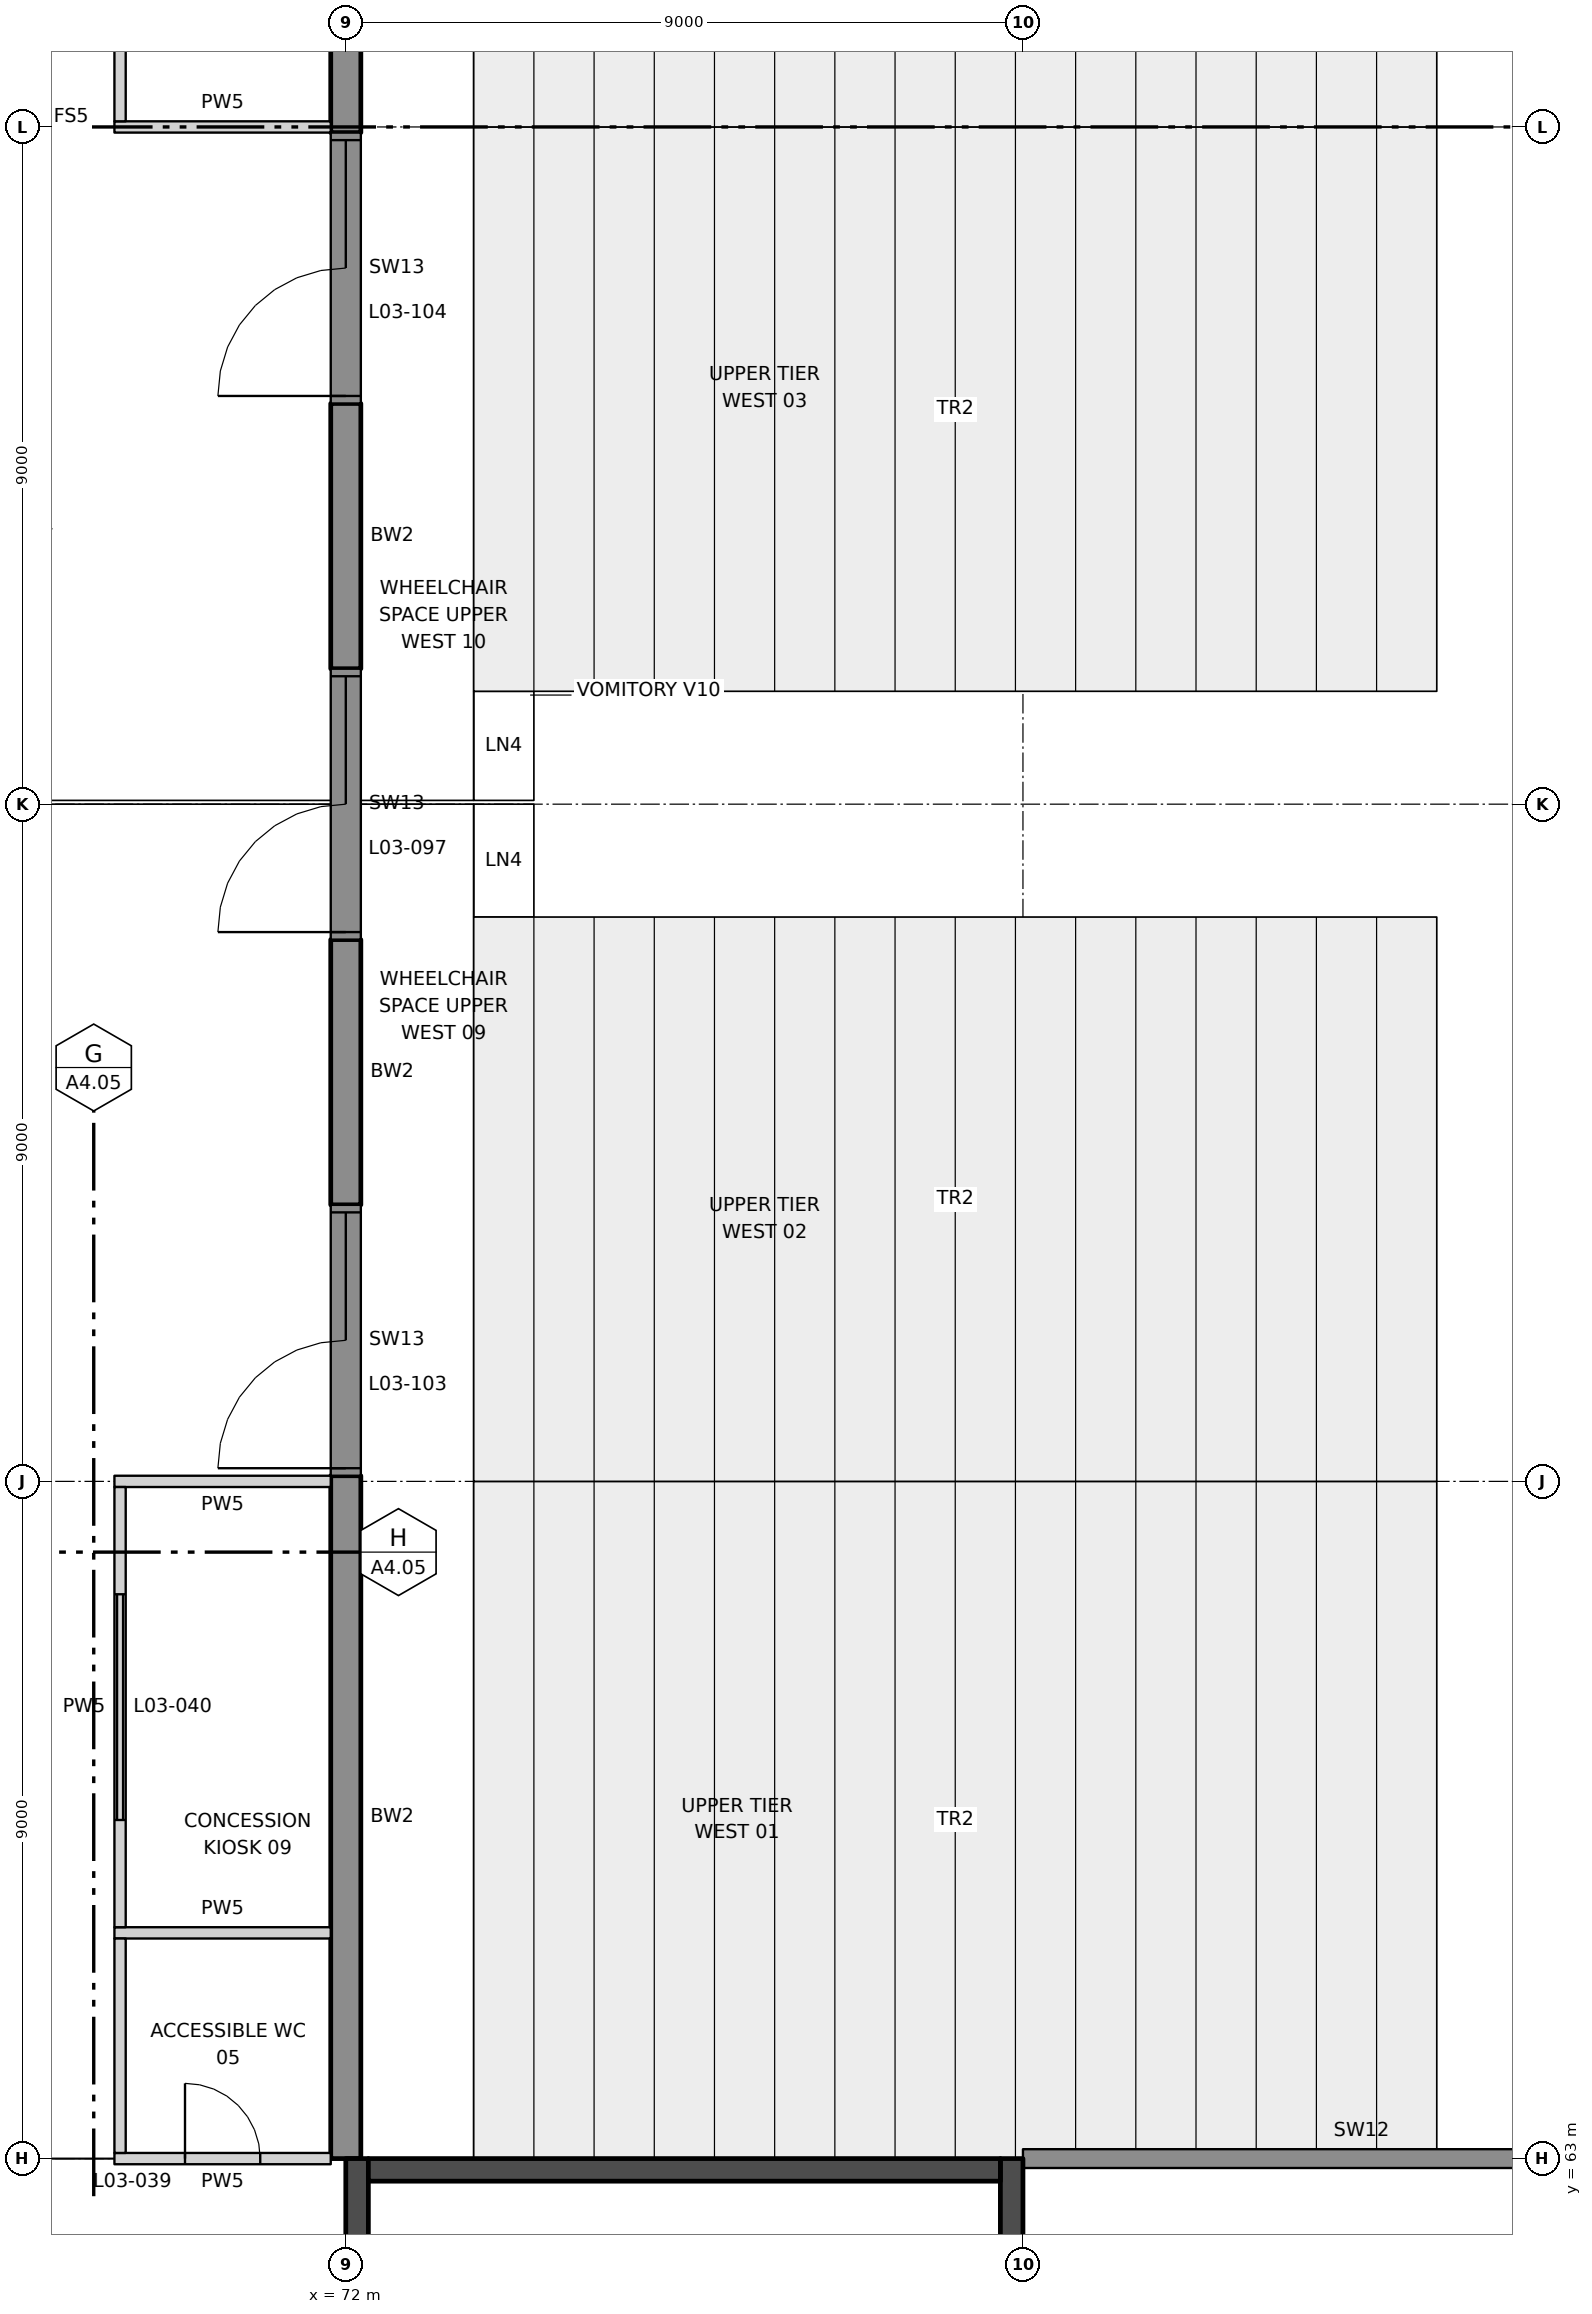
"""IFC4 building model, lengths in metres.
Left out: names, types, materials, properties, quantities, classifications, styles, units other than length and angle.
Written with IfcOpenShell. Run it as: python <this file> out.ifc"""

import sys

from ifc_helpers import new_model, si_unit, direction, frame, frame_2d, origin, place, context, subcontext, project, spatial, rectangle, extrude, element, fill, save


model = new_model("IFC4")
c1 = context("Model", 3, precision=1e-05, world=origin(), true_north=direction((0.0, 1.0)))
c2 = subcontext(c1, "Body", "Model", "MODEL_VIEW")
j1 = project(units=[si_unit("LENGTHUNIT", "METRE"), si_unit("PLANEANGLEUNIT", "RADIAN")], contexts=[c1])
p1 = place(None, origin())
s1 = spatial("IfcSite", under=j1, at=p1, CompositionType="ELEMENT")
p2 = place(p1, origin())
s2 = spatial("IfcBuilding", under=s1, at=p2, CompositionType="ELEMENT")
p3 = place(p2, frame((0.0, 0.0, 22.0)))
s3 = spatial("IfcBuildingStorey", under=s2, at=p3, CompositionType="ELEMENT", Elevation=22.0)
p4 = place(p3, frame((72.0, 99.0, 0.0), z_axis=(0.0, 0.0, 1.0), x_axis=(0.0, -1.0, 0.0)))
e1 = element("IfcWall", 1, at=p4, inside=s3, PredefinedType="SOLIDWALL", context=c2, shape_type="SweptSolid", body=[
    extrude(rectangle(XDim=9.075, YDim=0.4, at=frame_2d((4.538, 0.0))), origin(), (0.0, 0.0, 1.0), 6.0),
])
for number, where, z_axis, x_axis in (
    (2, (72.0, 86.325, 0.0), (0.0, 0.0, 1.0), (0.0, -1.0, 0.0)),
    (3, (72.0, 79.2, 0.0), (0.0, 0.0, 1.0), (0.0, -1.0, 0.0)),
):
    element("IfcWall", number, at=place(p3, frame(where, z_axis=z_axis, x_axis=x_axis)), inside=s3, PredefinedType="SOLIDWALL", context=c2, shape_type="SweptSolid", body=[
        extrude(rectangle(XDim=3.525, YDim=0.4, at=frame_2d((1.762, 0.0))), origin(), (0.0, 0.0, 1.0), 6.0),
    ])
p5 = place(p3, frame((72.0, 72.075, 0.0), z_axis=(0.0, 0.0, 1.0), x_axis=(0.0, -1.0, 0.0)))
e4 = element("IfcWall", 4, at=p5, inside=s3, PredefinedType="SOLIDWALL", context=c2, shape_type="SweptSolid", body=[
    extrude(rectangle(XDim=9.075, YDim=0.4, at=frame_2d((4.538, 0.0))), origin(), (0.0, 0.0, 1.0), 6.0),
])
p6 = place(p3, frame((68.925, 63.0, 0.0), z_axis=(0.0, 0.0, 1.0), x_axis=(1.0, 0.0, 0.0)))
e5 = element("IfcWall", 5, at=p6, inside=s3, PredefinedType="PARTITIONING", context=c2, shape_type="SweptSolid", body=[
    extrude(rectangle(XDim=2.875, YDim=0.15, at=frame_2d((1.438, 0.0))), origin(), (0.0, 0.0, 1.0), 4.7),
])
p7 = place(p6, frame((0.938, 0.0, 0.0)))
e6 = element("IfcOpeningElement", 6, at=p7, cuts=e5, PredefinedType="OPENING", context=c2, shape_type="SweptSolid", body=[
    extrude(rectangle(XDim=1.0, YDim=2.1, at=frame_2d((0.5, 1.05))), frame((0.0, 0.085, 0.0), z_axis=(0.0, -1.0, 0.0), x_axis=(1.0, 0.0, 0.0)), (0.0, 0.0, 1.0), 0.17),
])
p8 = place(p3, frame((68.925, 66.0, 0.0), z_axis=(0.0, 0.0, 1.0), x_axis=(1.0, 0.0, 0.0)))
e7 = element("IfcWall", 7, at=p8, inside=s3, PredefinedType="PARTITIONING", context=c2, shape_type="SweptSolid", body=[
    extrude(rectangle(XDim=2.875, YDim=0.15, at=frame_2d((1.438, 0.0))), origin(), (0.0, 0.0, 1.0), 6.0),
])
for number, where, z_axis, x_axis in (
    (8, (68.925, 72.0, 0.0), (0.0, 0.0, 1.0), (1.0, 0.0, 0.0)),
    (9, (68.925, 90.0, 0.0), (0.0, 0.0, 1.0), (1.0, 0.0, 0.0)),
):
    element("IfcWall", number, at=place(p3, frame(where, z_axis=z_axis, x_axis=x_axis)), inside=s3, PredefinedType="PARTITIONING", context=c2, shape_type="SweptSolid", body=[
        extrude(rectangle(XDim=2.875, YDim=0.15, at=frame_2d((1.438, 0.0))), origin(), (0.0, 0.0, 1.0), 4.7),
    ])
p9 = place(p3, frame((69.0, 63.075, 0.0), z_axis=(0.0, 0.0, 1.0), x_axis=(0.0, 1.0, 0.0)))
e10 = element("IfcWall", 10, at=p9, inside=s3, PredefinedType="PARTITIONING", context=c2, shape_type="SweptSolid", body=[
    extrude(rectangle(XDim=2.85, YDim=0.15, at=frame_2d((1.425, 0.0))), origin(), (0.0, 0.0, 1.0), 6.0),
])
p10 = place(p3, frame((69.0, 66.075, 0.0), z_axis=(0.0, 0.0, 1.0), x_axis=(0.0, 1.0, 0.0)))
e11 = element("IfcWall", 11, at=p10, inside=s3, PredefinedType="PARTITIONING", context=c2, shape_type="SweptSolid", body=[
    extrude(rectangle(XDim=5.85, YDim=0.15, at=frame_2d((2.925, 0.0))), origin(), (0.0, 0.0, 1.0), 6.0),
])
p11 = place(p10, frame((1.425, 0.0, 0.0)))
e12 = element("IfcOpeningElement", 12, at=p11, cuts=e11, PredefinedType="OPENING", context=c2, shape_type="SweptSolid", body=[
    extrude(rectangle(XDim=3.0, YDim=2.4, at=frame_2d((1.5, 1.2))), frame((0.0, 0.085, 0.0), z_axis=(0.0, -1.0, 0.0), x_axis=(1.0, 0.0, 0.0)), (0.0, 0.0, 1.0), 0.17),
])
p12 = place(p3, frame((69.0, 90.075, 0.0), z_axis=(0.0, 0.0, 1.0), x_axis=(0.0, 1.0, 0.0)))
e13 = element("IfcWall", 13, at=p12, inside=s3, PredefinedType="PARTITIONING", context=c2, shape_type="SweptSolid", body=[
    extrude(rectangle(XDim=5.85, YDim=0.15, at=frame_2d((2.925, 0.0))), origin(), (0.0, 0.0, 1.0), 6.0),
])
p13 = place(p12, frame((1.425, 0.0, 0.0)))
e14 = element("IfcOpeningElement", 14, at=p13, cuts=e13, PredefinedType="OPENING", context=c2, shape_type="SweptSolid", body=[
    extrude(rectangle(XDim=3.0, YDim=2.4, at=frame_2d((1.5, 1.2))), frame((0.0, 0.085, 0.0), z_axis=(0.0, -1.0, 0.0), x_axis=(1.0, 0.0, 0.0)), (0.0, 0.0, 1.0), 0.17),
])
p14 = place(p3, frame((80.85, 63.0, 0.0), z_axis=(0.0, 0.0, 1.0), x_axis=(0.0, -1.0, 0.0)))
e15 = element("IfcWall", 15, at=p14, inside=s3, PredefinedType="SHEAR", context=c2, shape_type="SweptSolid", body=[
    extrude(rectangle(XDim=18.0, YDim=0.3, at=frame_2d((9.0, 0.0))), origin(), (0.0, 0.0, 1.0), 6.0),
])
p15 = place(p14, frame((8.6, 0.0, 0.0)))
e16 = element("IfcOpeningElement", 16, at=p15, cuts=e15, PredefinedType="OPENING", context=c2, shape_type="SweptSolid", body=[
    extrude(rectangle(XDim=1.2, YDim=2.1, at=frame_2d((0.6, 1.05))), frame((0.0, 0.16, 0.0), z_axis=(0.0, -1.0, 0.0), x_axis=(1.0, 0.0, 0.0)), (0.0, 0.0, 1.0), 0.32),
])
p16 = place(p3, frame((72.15, 63.0, 0.0), z_axis=(0.0, 0.0, 1.0), x_axis=(0.0, -1.0, 0.0)))
e17 = element("IfcWall", 17, at=p16, inside=s3, PredefinedType="SHEAR", context=c2, shape_type="SweptSolid", body=[
    extrude(rectangle(XDim=18.0, YDim=0.3, at=frame_2d((9.0, 0.0))), origin(), (0.0, 0.0, 1.0), 6.0),
])
p17 = place(p3, frame((80.7, 62.85, 0.0), z_axis=(0.0, 0.0, 1.0), x_axis=(-1.0, 0.0, 0.0)))
e18 = element("IfcWall", 18, at=p17, inside=s3, PredefinedType="SHEAR", context=c2, shape_type="SweptSolid", body=[
    extrude(rectangle(XDim=8.4, YDim=0.3, at=frame_2d((4.2, 0.0))), origin(), (0.0, 0.0, 1.0), 6.0),
])
p18 = place(p3, frame((81.0, 63.0, 0.0), z_axis=(0.0, 0.0, 1.0), x_axis=(1.0, 0.0, 0.0)))
e19 = element("IfcWall", 19, at=p18, inside=s3, PredefinedType="SOLIDWALL", context=c2, shape_type="SweptSolid", body=[
    extrude(rectangle(XDim=9.0, YDim=0.25, at=frame_2d((4.5, 0.0))), origin(), (0.0, 0.0, 1.0), 4.7),
])
p19 = place(p3, frame((72.0, 79.2, 0.0), z_axis=(0.0, 0.0, 1.0), x_axis=(0.0, 1.0, 0.0)))
e20 = element("IfcWall", 20, at=p19, inside=s3, PredefinedType="SOLIDWALL", context=c2, shape_type="SweptSolid", body=[
    extrude(rectangle(XDim=3.6, YDim=0.4, at=frame_2d((1.8, 0.0))), origin(), (0.0, 0.0, 1.0), 3.0),
])
p20 = place(p19, frame((0.1, 0.0, 0.0)))
e21 = element("IfcOpeningElement", 21, at=p20, cuts=e20, PredefinedType="OPENING", context=c2, shape_type="SweptSolid", body=[
    extrude(rectangle(XDim=3.4, YDim=2.4, at=frame_2d((1.7, 1.2))), frame((0.0, 0.21, 0.0), z_axis=(0.0, -1.0, 0.0), x_axis=(1.0, 0.0, 0.0)), (0.0, 0.0, 1.0), 0.42),
])
p21 = place(p3, frame((72.0, 72.075, 0.0), z_axis=(0.0, 0.0, 1.0), x_axis=(0.0, 1.0, 0.0)))
e22 = element("IfcWall", 22, at=p21, inside=s3, PredefinedType="SOLIDWALL", context=c2, shape_type="SweptSolid", body=[
    extrude(rectangle(XDim=3.6, YDim=0.4, at=frame_2d((1.8, 0.0))), origin(), (0.0, 0.0, 1.0), 3.0),
])
p22 = place(p21, frame((0.1, 0.0, 0.0)))
e23 = element("IfcOpeningElement", 23, at=p22, cuts=e22, PredefinedType="OPENING", context=c2, shape_type="SweptSolid", body=[
    extrude(rectangle(XDim=3.4, YDim=2.4, at=frame_2d((1.7, 1.2))), frame((0.0, 0.21, 0.0), z_axis=(0.0, -1.0, 0.0), x_axis=(1.0, 0.0, 0.0)), (0.0, 0.0, 1.0), 0.42),
])
p23 = place(p3, frame((72.0, 86.325, 0.0), z_axis=(0.0, 0.0, 1.0), x_axis=(0.0, 1.0, 0.0)))
e24 = element("IfcWall", 24, at=p23, inside=s3, PredefinedType="SOLIDWALL", context=c2, shape_type="SweptSolid", body=[
    extrude(rectangle(XDim=3.6, YDim=0.4, at=frame_2d((1.8, 0.0))), origin(), (0.0, 0.0, 1.0), 3.0),
])
p24 = place(p23, frame((0.1, 0.0, 0.0)))
e25 = element("IfcOpeningElement", 25, at=p24, cuts=e24, PredefinedType="OPENING", context=c2, shape_type="SweptSolid", body=[
    extrude(rectangle(XDim=3.4, YDim=2.4, at=frame_2d((1.7, 1.2))), frame((0.0, 0.21, 0.0), z_axis=(0.0, -1.0, 0.0), x_axis=(1.0, 0.0, 0.0)), (0.0, 0.0, 1.0), 0.42),
])
p25 = place(p7, origin())
e26 = element("IfcDoor", 26, at=p25, inside=s3, OperationType="SINGLE_SWING_LEFT", PredefinedType="DOOR", context=c2, shape_type="SweptSolid", body=[
    extrude(rectangle(XDim=1.0, YDim=2.1, at=frame_2d((0.5, 1.05))), frame((0.0, 0.025, 0.0), z_axis=(0.0, -1.0, 0.0), x_axis=(1.0, 0.0, 0.0)), (0.0, 0.0, 1.0), 0.05),
])
fill(e6, e26)
p26 = place(p11, origin())
e27 = element("IfcDoor", 27, at=p26, inside=s3, OperationType="ROLLINGUP", PredefinedType="DOOR", context=c2, shape_type="SweptSolid", body=[
    extrude(rectangle(XDim=3.0, YDim=2.4, at=frame_2d((1.5, 1.2))), frame((0.0, 0.025, 0.0), z_axis=(0.0, -1.0, 0.0), x_axis=(1.0, 0.0, 0.0)), (0.0, 0.0, 1.0), 0.05),
])
fill(e12, e27)
p27 = place(p20, origin())
e28 = element("IfcDoor", 28, at=p27, inside=s3, OperationType="DOUBLE_DOOR_SINGLE_SWING", PredefinedType="DOOR", context=c2, shape_type="SweptSolid", body=[
    extrude(rectangle(XDim=3.4, YDim=2.4, at=frame_2d((1.7, 1.2))), frame((0.0, 0.025, 0.0), z_axis=(0.0, -1.0, 0.0), x_axis=(1.0, 0.0, 0.0)), (0.0, 0.0, 1.0), 0.05),
])
fill(e21, e28)
p28 = place(p22, origin())
e29 = element("IfcDoor", 29, at=p28, inside=s3, OperationType="DOUBLE_DOOR_SINGLE_SWING", PredefinedType="DOOR", context=c2, shape_type="SweptSolid", body=[
    extrude(rectangle(XDim=3.4, YDim=2.4, at=frame_2d((1.7, 1.2))), frame((0.0, 0.025, 0.0), z_axis=(0.0, -1.0, 0.0), x_axis=(1.0, 0.0, 0.0)), (0.0, 0.0, 1.0), 0.05),
])
fill(e23, e29)
p29 = place(p24, origin())
e30 = element("IfcDoor", 30, at=p29, inside=s3, OperationType="DOUBLE_DOOR_SINGLE_SWING", PredefinedType="DOOR", context=c2, shape_type="SweptSolid", body=[
    extrude(rectangle(XDim=3.4, YDim=2.4, at=frame_2d((1.7, 1.2))), frame((0.0, 0.025, 0.0), z_axis=(0.0, -1.0, 0.0), x_axis=(1.0, 0.0, 0.0)), (0.0, 0.0, 1.0), 0.05),
])
fill(e25, e30)
save(model, sys.argv[1])
